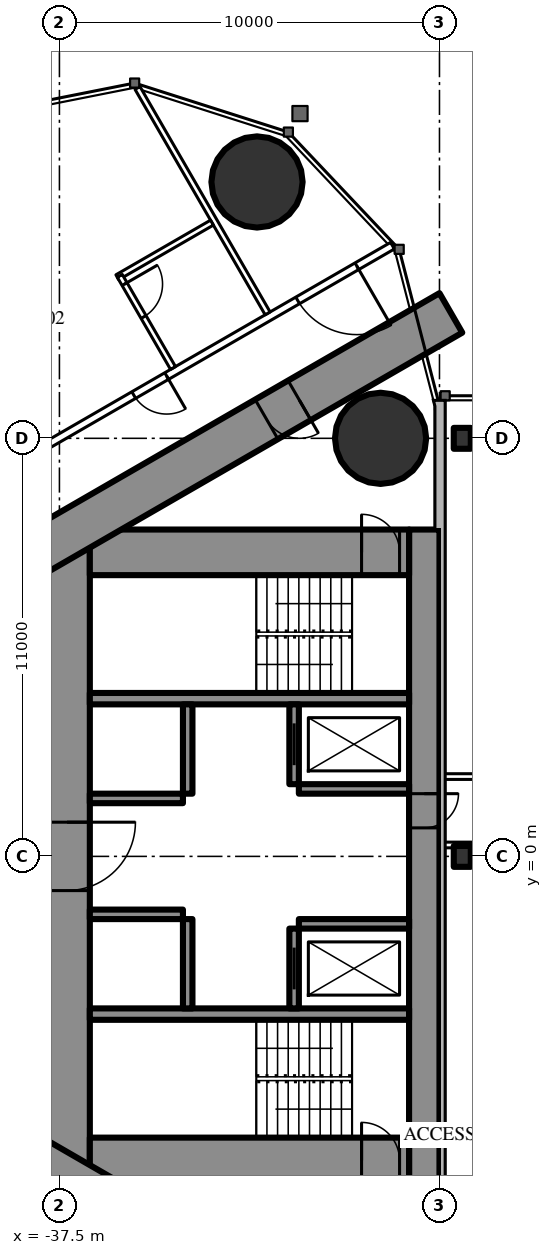
"""IFC4 building model, lengths in metres.
Left out: names, types, materials, properties, quantities, classifications, styles, units other than length and angle.
Written with IfcOpenShell. Run it as: python <this file> out.ifc"""

import sys

from ifc_helpers import new_model, si_unit, direction, frame, frame_2d, origin, origin_2d, place, context, subcontext, project, spatial, rectangle, circle, i_section, extrude, element, fill, save


model = new_model("IFC4")
c1 = context("Model", 3, precision=1e-05, world=origin(), true_north=direction((0.0, 1.0)))
c2 = subcontext(c1, "Body", "Model", "MODEL_VIEW")
j1 = project(units=[si_unit("LENGTHUNIT", "METRE"), si_unit("PLANEANGLEUNIT", "RADIAN")], contexts=[c1])
p1 = place(None, origin())
s1 = spatial("IfcSite", under=j1, at=p1, CompositionType="ELEMENT")
p2 = place(p1, origin())
s2 = spatial("IfcBuilding", under=s1, at=p2, CompositionType="ELEMENT")
p3 = place(p2, frame((0.0, 0.0, 244.1)))
s3 = spatial("IfcBuildingStorey", under=s2, at=p3, CompositionType="ELEMENT", Elevation=244.1)
for number, where, z_axis, x_axis in (
    (1, (-32.301, 17.745, 0.0), (0.0, 0.0, 1.0), (1.0, 0.0, 0.0)),
    (2, (-29.05, 11.0, 0.0), (0.0, 0.0, 1.0), (1.0, 0.0, 0.0)),
):
    element("IfcColumn", number, at=place(p3, frame(where, z_axis=z_axis, x_axis=x_axis)), inside=s3, PredefinedType="COLUMN", context=c2, shape_type="SweptSolid", body=[
        extrude(circle(Radius=1.2, at=origin_2d()), origin(), (0.0, 0.0, 1.0), 3.6),
    ])
p4 = place(p3, frame((-27.9, 8.6, 0.0), z_axis=(0.0, 0.0, 1.0), x_axis=(0.0, -1.0, 0.0)))
e3 = element("IfcWall", 3, at=p4, inside=s3, PredefinedType="SHEAR", context=c2, shape_type="SweptSolid", body=[
    extrude(rectangle(XDim=17.2, YDim=0.8, at=frame_2d((8.6, 0.0))), origin(), (0.0, 0.0, 1.0), 3.6),
])
p5 = place(p4, frame((6.95, 0.0, 0.0)))
e4 = element("IfcOpeningElement", 4, at=p5, cuts=e3, PredefinedType="OPENING", context=c2, shape_type="SweptSolid", body=[
    extrude(rectangle(XDim=0.9, YDim=2.2, at=frame_2d((0.45, 1.1))), frame((0.0, 0.41, 0.0), z_axis=(0.0, -1.0, 0.0), x_axis=(1.0, 0.0, 0.0)), (0.0, 0.0, 1.0), 0.82),
])
p6 = place(p3, frame((-37.3, 8.6, 0.0), z_axis=(0.0, 0.0, 1.0), x_axis=(0.0, -1.0, 0.0)))
e5 = element("IfcWall", 5, at=p6, inside=s3, PredefinedType="SHEAR", context=c2, shape_type="SweptSolid", body=[
    extrude(rectangle(XDim=17.2, YDim=1.2, at=frame_2d((8.6, 0.0))), origin(), (0.0, 0.0, 1.0), 3.6),
])
p7 = place(p6, frame((7.7, 0.0, 0.0)))
e6 = element("IfcOpeningElement", 6, at=p7, cuts=e5, PredefinedType="OPENING", context=c2, shape_type="SweptSolid", body=[
    extrude(rectangle(XDim=1.8, YDim=2.2, at=frame_2d((0.9, 1.1))), frame((0.0, 0.61, 0.0), z_axis=(0.0, -1.0, 0.0), x_axis=(1.0, 0.0, 0.0)), (0.0, 0.0, 1.0), 1.22),
])
p8 = place(p3, frame((-28.3, 8.0, 0.0), z_axis=(0.0, 0.0, 1.0), x_axis=(-1.0, 0.0, 0.0)))
e7 = element("IfcWall", 7, at=p8, inside=s3, PredefinedType="SHEAR", context=c2, shape_type="SweptSolid", body=[
    extrude(rectangle(XDim=8.4, YDim=1.2, at=frame_2d((4.2, 0.0))), origin(), (0.0, 0.0, 1.0), 3.6),
])
p9 = place(p8, frame((0.25, 0.0, 0.0)))
e8 = element("IfcOpeningElement", 8, at=p9, cuts=e7, PredefinedType="OPENING", context=c2, shape_type="SweptSolid", body=[
    extrude(rectangle(XDim=1.0, YDim=2.2, at=frame_2d((0.5, 1.1))), frame((0.0, 0.61, 0.0), z_axis=(0.0, -1.0, 0.0), x_axis=(1.0, 0.0, 0.0)), (0.0, 0.0, 1.0), 1.22),
])
p10 = place(p3, frame((-28.3, -8.0, 0.0), z_axis=(0.0, 0.0, 1.0), x_axis=(-1.0, 0.0, 0.0)))
e9 = element("IfcWall", 9, at=p10, inside=s3, PredefinedType="SHEAR", context=c2, shape_type="SweptSolid", body=[
    extrude(rectangle(XDim=8.4, YDim=1.2, at=frame_2d((4.2, 0.0))), origin(), (0.0, 0.0, 1.0), 3.6),
])
p11 = place(p10, frame((0.25, 0.0, 0.0)))
e10 = element("IfcOpeningElement", 10, at=p11, cuts=e9, PredefinedType="OPENING", context=c2, shape_type="SweptSolid", body=[
    extrude(rectangle(XDim=1.0, YDim=2.2, at=frame_2d((0.5, 1.1))), frame((0.0, 0.61, 0.0), z_axis=(0.0, -1.0, 0.0), x_axis=(1.0, 0.0, 0.0)), (0.0, 0.0, 1.0), 1.22),
])
for number, where, z_axis, x_axis in (
    (11, (-28.3, 4.15, 0.0), (0.0, 0.0, 1.0), (-1.0, 0.0, 0.0)),
    (12, (-28.3, -4.15, 0.0), (0.0, 0.0, 1.0), (-1.0, 0.0, 0.0)),
):
    element("IfcWall", number, at=place(p3, frame(where, z_axis=z_axis, x_axis=x_axis)), inside=s3, PredefinedType="SHEAR", context=c2, shape_type="SweptSolid", body=[
        extrude(rectangle(XDim=8.4, YDim=0.3, at=frame_2d((4.2, 0.0))), origin(), (0.0, 0.0, 1.0), 3.6),
    ])
p12 = place(p3, frame((-31.325, 4.0, 0.0), z_axis=(0.0, 0.0, 1.0), x_axis=(0.0, -1.0, 0.0)))
e13 = element("IfcWall", 13, at=p12, inside=s3, PredefinedType="SHEAR", context=c2, shape_type="SweptSolid", body=[
    extrude(rectangle(XDim=2.1, YDim=0.25, at=frame_2d((1.05, 0.0))), origin(), (0.0, 0.0, 1.0), 3.6),
])
p13 = place(p12, frame((0.5, 0.0, 0.0)))
e14 = element("IfcOpeningElement", 14, at=p13, cuts=e13, PredefinedType="OPENING", context=c2, shape_type="SweptSolid", body=[
    extrude(rectangle(XDim=1.1, YDim=2.2, at=frame_2d((0.55, 1.1))), frame((0.0, 0.135, 0.0), z_axis=(0.0, -1.0, 0.0), x_axis=(1.0, 0.0, 0.0)), (0.0, 0.0, 1.0), 0.27),
])
p14 = place(p3, frame((-34.125, 4.0, 0.0), z_axis=(0.0, 0.0, 1.0), x_axis=(0.0, -1.0, 0.0)))
e15 = element("IfcWall", 15, at=p14, inside=s3, PredefinedType="SHEAR", context=c2, shape_type="SweptSolid", body=[
    extrude(rectangle(XDim=2.35, YDim=0.25, at=frame_2d((1.175, 0.0))), origin(), (0.0, 0.0, 1.0), 3.6),
])
p15 = place(p3, frame((-28.3, 1.775, 0.0), z_axis=(0.0, 0.0, 1.0), x_axis=(-1.0, 0.0, 0.0)))
e16 = element("IfcWall", 16, at=p15, inside=s3, PredefinedType="SHEAR", context=c2, shape_type="SweptSolid", body=[
    extrude(rectangle(XDim=2.9, YDim=0.25, at=frame_2d((1.45, 0.0))), origin(), (0.0, 0.0, 1.0), 3.6),
])
p16 = place(p3, frame((-34.25, 1.525, 0.0), z_axis=(0.0, 0.0, 1.0), x_axis=(-1.0, 0.0, 0.0)))
e17 = element("IfcWall", 17, at=p16, inside=s3, PredefinedType="SHEAR", context=c2, shape_type="SweptSolid", body=[
    extrude(rectangle(XDim=2.45, YDim=0.25, at=frame_2d((1.225, 0.0))), origin(), (0.0, 0.0, 1.0), 3.6),
])
p17 = place(p3, frame((-31.325, -1.9, 0.0), z_axis=(0.0, 0.0, 1.0), x_axis=(0.0, -1.0, 0.0)))
e18 = element("IfcWall", 18, at=p17, inside=s3, PredefinedType="SHEAR", context=c2, shape_type="SweptSolid", body=[
    extrude(rectangle(XDim=2.1, YDim=0.25, at=frame_2d((1.05, 0.0))), origin(), (0.0, 0.0, 1.0), 3.6),
])
p18 = place(p17, frame((0.5, 0.0, 0.0)))
e19 = element("IfcOpeningElement", 19, at=p18, cuts=e18, PredefinedType="OPENING", context=c2, shape_type="SweptSolid", body=[
    extrude(rectangle(XDim=1.1, YDim=2.2, at=frame_2d((0.55, 1.1))), frame((0.0, 0.135, 0.0), z_axis=(0.0, -1.0, 0.0), x_axis=(1.0, 0.0, 0.0)), (0.0, 0.0, 1.0), 0.27),
])
p19 = place(p3, frame((-34.125, -1.65, 0.0), z_axis=(0.0, 0.0, 1.0), x_axis=(0.0, -1.0, 0.0)))
e20 = element("IfcWall", 20, at=p19, inside=s3, PredefinedType="SHEAR", context=c2, shape_type="SweptSolid", body=[
    extrude(rectangle(XDim=2.35, YDim=0.25, at=frame_2d((1.175, 0.0))), origin(), (0.0, 0.0, 1.0), 3.6),
])
p20 = place(p3, frame((-28.3, -1.775, 0.0), z_axis=(0.0, 0.0, 1.0), x_axis=(-1.0, 0.0, 0.0)))
e21 = element("IfcWall", 21, at=p20, inside=s3, PredefinedType="SHEAR", context=c2, shape_type="SweptSolid", body=[
    extrude(rectangle(XDim=2.9, YDim=0.25, at=frame_2d((1.45, 0.0))), origin(), (0.0, 0.0, 1.0), 3.6),
])
p21 = place(p3, frame((-34.25, -1.525, 0.0), z_axis=(0.0, 0.0, 1.0), x_axis=(-1.0, 0.0, 0.0)))
e22 = element("IfcWall", 22, at=p21, inside=s3, PredefinedType="SHEAR", context=c2, shape_type="SweptSolid", body=[
    extrude(rectangle(XDim=2.45, YDim=0.25, at=frame_2d((1.225, 0.0))), origin(), (0.0, 0.0, 1.0), 3.6),
])
p22 = place(p3, frame((-27.2, 14.3, 0.0), z_axis=(0.0, 0.0, 1.0), x_axis=(-0.866026593062, -0.499997940104, 0.0)))
e23 = element("IfcWall", 23, at=p22, inside=s3, PredefinedType="SHEAR", context=c2, shape_type="SweptSolid", body=[
    extrude(rectangle(XDim=28.946, YDim=1.2, at=frame_2d((14.473, 0.0))), origin(), (0.0, 0.0, 1.0), 3.6),
])
p23 = place(p22, frame((4.6, 0.0, 0.0)))
e24 = element("IfcOpeningElement", 24, at=p23, cuts=e23, PredefinedType="OPENING", context=c2, shape_type="SweptSolid", body=[
    extrude(rectangle(XDim=1.0, YDim=2.2, at=frame_2d((0.5, 1.1))), frame((0.0, 0.61, 0.0), z_axis=(0.0, -1.0, 0.0), x_axis=(1.0, 0.0, 0.0)), (0.0, 0.0, 1.0), 1.22),
])
p24 = place(p22, frame((13.395, 0.0, 0.0)))
e25 = element("IfcOpeningElement", 25, at=p24, cuts=e23, PredefinedType="OPENING", context=c2, shape_type="SweptSolid", body=[
    extrude(rectangle(XDim=1.8, YDim=2.2, at=frame_2d((0.9, 1.1))), frame((0.0, 0.61, 0.0), z_axis=(0.0, -1.0, 0.0), x_axis=(1.0, 0.0, 0.0)), (0.0, 0.0, 1.0), 1.22),
])
p25 = place(p3, frame((-27.2, -14.3, 0.0), z_axis=(0.0, 0.0, 1.0), x_axis=(-0.866024021859, 0.500002393557, 0.0)))
e26 = element("IfcWall", 26, at=p25, inside=s3, PredefinedType="SHEAR", context=c2, shape_type="SweptSolid", body=[
    extrude(rectangle(XDim=27.907, YDim=1.2, at=frame_2d((13.954, 0.0))), origin(), (0.0, 0.0, 1.0), 3.6),
])
p26 = place(p25, frame((4.6, 0.0, 0.0)))
e27 = element("IfcOpeningElement", 27, at=p26, cuts=e26, PredefinedType="OPENING", context=c2, shape_type="SweptSolid", body=[
    extrude(rectangle(XDim=1.0, YDim=2.2, at=frame_2d((0.5, 1.1))), frame((0.0, 0.61, 0.0), z_axis=(0.0, -1.0, 0.0), x_axis=(1.0, 0.0, 0.0)), (0.0, 0.0, 1.0), 1.22),
])
p27 = place(p25, frame((13.395, 0.0, 0.0)))
e28 = element("IfcOpeningElement", 28, at=p27, cuts=e26, PredefinedType="OPENING", context=c2, shape_type="SweptSolid", body=[
    extrude(rectangle(XDim=1.8, YDim=2.2, at=frame_2d((0.9, 1.1))), frame((0.0, 0.61, 0.0), z_axis=(0.0, -1.0, 0.0), x_axis=(1.0, 0.0, 0.0)), (0.0, 0.0, 1.0), 1.22),
])
for number, where, z_axis, x_axis in (
    (29, (-26.9, 0.0, 0.0), (0.0, 0.0, 1.0), (1.0, 0.0, 0.0)),
    (30, (-26.9, 11.0, 0.0), (0.0, 0.0, 1.0), (1.0, 0.0, 0.0)),
):
    element("IfcColumn", number, at=place(p3, frame(where, z_axis=z_axis, x_axis=x_axis)), inside=s3, PredefinedType="COLUMN", context=c2, shape_type="SweptSolid", body=[
        extrude(i_section(OverallWidth=0.448, OverallDepth=0.55, WebThickness=0.072, FlangeThickness=0.115, FilletRadius=0.02, at=origin_2d()), origin(), (0.0, 0.0, 1.0), 3.6),
    ])
p28 = place(p3, frame((-28.737, 16.068, 0.0), z_axis=(0.0, 0.0, 1.0), x_axis=(-0.866026057212, -0.499998868229, 0.0)))
e31 = element("IfcWall", 31, at=p28, inside=s3, PredefinedType="PARTITIONING", context=c2, shape_type="SweptSolid", body=[
    extrude(rectangle(XDim=32.137, YDim=0.2, at=frame_2d((16.068, 0.0))), origin(), (0.0, 0.0, 1.0), 3.35),
])
p29 = place(p28, frame((1.08, 0.0, 0.0)))
e32 = element("IfcOpeningElement", 32, at=p29, cuts=e31, PredefinedType="OPENING", context=c2, shape_type="SweptSolid", body=[
    extrude(rectangle(XDim=1.8, YDim=2.04, at=frame_2d((0.9, 1.02))), frame((0.0, 0.11, 0.0), z_axis=(0.0, -1.0, 0.0), x_axis=(1.0, 0.0, 0.0)), (0.0, 0.0, 1.0), 0.22),
])
p30 = place(p28, frame((6.86, 0.0, 0.0)))
e33 = element("IfcOpeningElement", 33, at=p30, cuts=e31, PredefinedType="OPENING", context=c2, shape_type="SweptSolid", body=[
    extrude(rectangle(XDim=1.0, YDim=2.2, at=frame_2d((0.5, 1.1))), frame((0.0, 0.11, 0.0), z_axis=(0.0, -1.0, 0.0), x_axis=(1.0, 0.0, 0.0)), (0.0, 0.0, 1.0), 0.22),
])
p31 = place(p28, frame((18.867, 0.0, 0.0)))
e34 = element("IfcOpeningElement", 34, at=p31, cuts=e31, PredefinedType="OPENING", context=c2, shape_type="SweptSolid", body=[
    extrude(rectangle(XDim=0.95, YDim=2.2, at=frame_2d((0.475, 1.1))), frame((0.0, 0.11, 0.0), z_axis=(0.0, -1.0, 0.0), x_axis=(1.0, 0.0, 0.0)), (0.0, 0.0, 1.0), 0.22),
])
p32 = place(p28, frame((23.015, 0.0, 0.0)))
e35 = element("IfcOpeningElement", 35, at=p32, cuts=e31, PredefinedType="OPENING", context=c2, shape_type="SweptSolid", body=[
    extrude(rectangle(XDim=0.95, YDim=2.2, at=frame_2d((0.475, 1.1))), frame((0.0, 0.11, 0.0), z_axis=(0.0, -1.0, 0.0), x_axis=(1.0, 0.0, 0.0)), (0.0, 0.0, 1.0), 0.22),
])
p33 = place(p28, frame((27.226, 0.0, 0.0)))
e36 = element("IfcOpeningElement", 36, at=p33, cuts=e31, PredefinedType="OPENING", context=c2, shape_type="SweptSolid", body=[
    extrude(rectangle(XDim=1.8, YDim=2.2, at=frame_2d((0.9, 1.1))), frame((0.0, 0.11, 0.0), z_axis=(0.0, -1.0, 0.0), x_axis=(1.0, 0.0, 0.0)), (0.0, 0.0, 1.0), 0.22),
])
p34 = place(p3, frame((-32.022, 14.287, 0.0), z_axis=(0.0, 0.0, 1.0), x_axis=(-0.50000019414, 0.866025291697, 0.0)))
e37 = element("IfcWall", 37, at=p34, inside=s3, PredefinedType="PARTITIONING", context=c2, shape_type="SweptSolid", body=[
    extrude(rectangle(XDim=6.848, YDim=0.15, at=frame_2d((3.424, 0.0))), origin(), (0.0, 0.0, 1.0), 3.35),
])
p35 = place(p3, frame((-33.487, 16.675, 0.0), z_axis=(0.0, 0.0, 1.0), x_axis=(-0.866039941686, -0.499974818771, 0.0)))
e38 = element("IfcWall", 38, at=p35, inside=s3, PredefinedType="PARTITIONING", context=c2, shape_type="SweptSolid", body=[
    extrude(rectangle(XDim=2.875, YDim=0.15, at=frame_2d((1.438, 0.0))), origin(), (0.0, 0.0, 1.0), 3.35),
])
p36 = place(p3, frame((-34.511, 12.85, 0.0), z_axis=(0.0, 0.0, 1.0), x_axis=(-0.500011755427, 0.866018616679, 0.0)))
e39 = element("IfcWall", 39, at=p36, inside=s3, PredefinedType="PARTITIONING", context=c2, shape_type="SweptSolid", body=[
    extrude(rectangle(XDim=2.8, YDim=0.15, at=frame_2d((1.4, 0.0))), origin(), (0.0, 0.0, 1.0), 3.35),
])
p37 = place(p36, frame((1.55, 0.0, 0.0)))
e40 = element("IfcOpeningElement", 40, at=p37, cuts=e39, PredefinedType="OPENING", context=c2, shape_type="SweptSolid", body=[
    extrude(rectangle(XDim=1.0, YDim=2.2, at=frame_2d((0.5, 1.1))), frame((0.0, 0.085, 0.0), z_axis=(0.0, -1.0, 0.0), x_axis=(1.0, 0.0, 0.0)), (0.0, 0.0, 1.0), 0.17),
])
p38 = place(p3, frame((-27.5, 0.3, 0.0), z_axis=(0.0, 0.0, 1.0), x_axis=(1.0, 0.0, 0.0)))
e41 = element("IfcWall", 41, at=p38, inside=s3, PredefinedType="PARTITIONING", context=c2, shape_type="SweptSolid", body=[
    extrude(rectangle(XDim=55.0, YDim=0.15, at=frame_2d((27.5, 0.0))), origin(), (0.0, 0.0, 1.0), 2.4),
])
p39 = place(p38, frame((1.575, 0.0, 0.0)))
e42 = element("IfcOpeningElement", 42, at=p39, cuts=e41, PredefinedType="OPENING", context=c2, shape_type="SweptSolid", body=[
    extrude(rectangle(XDim=1.0, YDim=2.2, at=frame_2d((0.5, 1.1))), frame((0.0, 0.085, 0.0), z_axis=(0.0, -1.0, 0.0), x_axis=(1.0, 0.0, 0.0)), (0.0, 0.0, 1.0), 0.17),
])
p40 = place(p38, frame((8.525, 0.0, 0.0)))
e43 = element("IfcOpeningElement", 43, at=p40, cuts=e41, PredefinedType="OPENING", context=c2, shape_type="SweptSolid", body=[
    extrude(rectangle(XDim=1.05, YDim=2.4, at=frame_2d((0.525, 1.2))), frame((0.0, 0.085, 0.0), z_axis=(0.0, -1.0, 0.0), x_axis=(1.0, 0.0, 0.0)), (0.0, 0.0, 1.0), 0.17),
])
p41 = place(p38, frame((14.025, 0.0, 0.0)))
e44 = element("IfcOpeningElement", 44, at=p41, cuts=e41, PredefinedType="OPENING", context=c2, shape_type="SweptSolid", body=[
    extrude(rectangle(XDim=1.05, YDim=2.4, at=frame_2d((0.525, 1.2))), frame((0.0, 0.085, 0.0), z_axis=(0.0, -1.0, 0.0), x_axis=(1.0, 0.0, 0.0)), (0.0, 0.0, 1.0), 0.17),
])
p42 = place(p38, frame((25.025, 0.0, 0.0)))
e45 = element("IfcOpeningElement", 45, at=p42, cuts=e41, PredefinedType="OPENING", context=c2, shape_type="SweptSolid", body=[
    extrude(rectangle(XDim=1.05, YDim=2.4, at=frame_2d((0.525, 1.2))), frame((0.0, 0.085, 0.0), z_axis=(0.0, -1.0, 0.0), x_axis=(1.0, 0.0, 0.0)), (0.0, 0.0, 1.0), 0.17),
])
p43 = place(p38, frame((30.525, 0.0, 0.0)))
e46 = element("IfcOpeningElement", 46, at=p43, cuts=e41, PredefinedType="OPENING", context=c2, shape_type="SweptSolid", body=[
    extrude(rectangle(XDim=1.05, YDim=2.4, at=frame_2d((0.525, 1.2))), frame((0.0, 0.085, 0.0), z_axis=(0.0, -1.0, 0.0), x_axis=(1.0, 0.0, 0.0)), (0.0, 0.0, 1.0), 0.17),
])
p44 = place(p38, frame((41.525, 0.0, 0.0)))
e47 = element("IfcOpeningElement", 47, at=p44, cuts=e41, PredefinedType="OPENING", context=c2, shape_type="SweptSolid", body=[
    extrude(rectangle(XDim=1.05, YDim=2.4, at=frame_2d((0.525, 1.2))), frame((0.0, 0.085, 0.0), z_axis=(0.0, -1.0, 0.0), x_axis=(1.0, 0.0, 0.0)), (0.0, 0.0, 1.0), 0.17),
])
p45 = place(p38, frame((47.025, 0.0, 0.0)))
e48 = element("IfcOpeningElement", 48, at=p45, cuts=e41, PredefinedType="OPENING", context=c2, shape_type="SweptSolid", body=[
    extrude(rectangle(XDim=1.05, YDim=2.4, at=frame_2d((0.525, 1.2))), frame((0.0, 0.085, 0.0), z_axis=(0.0, -1.0, 0.0), x_axis=(1.0, 0.0, 0.0)), (0.0, 0.0, 1.0), 0.17),
])
p46 = place(p38, frame((52.525, 0.0, 0.0)))
e49 = element("IfcOpeningElement", 49, at=p46, cuts=e41, PredefinedType="OPENING", context=c2, shape_type="SweptSolid", body=[
    extrude(rectangle(XDim=1.05, YDim=2.4, at=frame_2d((0.525, 1.2))), frame((0.0, 0.085, 0.0), z_axis=(0.0, -1.0, 0.0), x_axis=(1.0, 0.0, 0.0)), (0.0, 0.0, 1.0), 0.17),
])
p47 = place(p3, frame((-27.5, 2.1, 0.0), z_axis=(0.0, 0.0, 1.0), x_axis=(1.0, 0.0, 0.0)))
e50 = element("IfcWall", 50, at=p47, inside=s3, PredefinedType="PARTITIONING", context=c2, shape_type="SweptSolid", body=[
    extrude(rectangle(XDim=5.85, YDim=0.15, at=frame_2d((2.925, 0.0))), origin(), (0.0, 0.0, 1.0), 3.4),
])
p48 = place(p47, frame((2.025, 0.0, 0.0)))
e51 = element("IfcOpeningElement", 51, at=p48, cuts=e50, PredefinedType="OPENING", context=c2, shape_type="SweptSolid", body=[
    extrude(rectangle(XDim=1.05, YDim=2.4, at=frame_2d((0.525, 1.2))), frame((0.0, 0.085, 0.0), z_axis=(0.0, -1.0, 0.0), x_axis=(1.0, 0.0, 0.0)), (0.0, 0.0, 1.0), 0.17),
])
p49 = place(p29, origin())
e52 = element("IfcDoor", 52, at=p49, inside=s3, OperationType="DOUBLE_DOOR_SINGLE_SWING", PredefinedType="DOOR", context=c2, shape_type="SweptSolid", body=[
    extrude(rectangle(XDim=1.8, YDim=2.04, at=frame_2d((0.9, 1.02))), frame((0.0, 0.025, 0.0), z_axis=(0.0, -1.0, 0.0), x_axis=(1.0, 0.0, 0.0)), (0.0, 0.0, 1.0), 0.05),
])
fill(e32, e52)
p50 = place(p37, origin())
e53 = element("IfcDoor", 53, at=p50, inside=s3, OperationType="SINGLE_SWING_RIGHT", PredefinedType="DOOR", context=c2, shape_type="SweptSolid", body=[
    extrude(rectangle(XDim=1.0, YDim=2.2, at=frame_2d((0.5, 1.1))), frame((0.0, 0.025, 0.0), z_axis=(0.0, -1.0, 0.0), x_axis=(1.0, 0.0, 0.0)), (0.0, 0.0, 1.0), 0.05),
])
fill(e40, e53)
p51 = place(p30, origin())
e54 = element("IfcDoor", 54, at=p51, inside=s3, OperationType="SINGLE_SWING_LEFT", PredefinedType="DOOR", context=c2, shape_type="SweptSolid", body=[
    extrude(rectangle(XDim=1.0, YDim=2.2, at=frame_2d((0.5, 1.1))), frame((0.0, 0.025, 0.0), z_axis=(0.0, -1.0, 0.0), x_axis=(1.0, 0.0, 0.0)), (0.0, 0.0, 1.0), 0.05),
])
fill(e33, e54)
p52 = place(p23, origin())
e55 = element("IfcDoor", 55, at=p52, inside=s3, OperationType="SINGLE_SWING_LEFT", PredefinedType="DOOR", context=c2, shape_type="SweptSolid", body=[
    extrude(rectangle(XDim=1.0, YDim=2.2, at=frame_2d((0.5, 1.1))), frame((0.0, 0.025, 0.0), z_axis=(0.0, -1.0, 0.0), x_axis=(1.0, 0.0, 0.0)), (0.0, 0.0, 1.0), 0.05),
])
fill(e24, e55)
p53 = place(p7, origin())
e56 = element("IfcDoor", 56, at=p53, inside=s3, OperationType="DOUBLE_DOOR_SINGLE_SWING", PredefinedType="DOOR", context=c2, shape_type="SweptSolid", body=[
    extrude(rectangle(XDim=1.8, YDim=2.2, at=frame_2d((0.9, 1.1))), frame((0.0, 0.025, 0.0), z_axis=(0.0, -1.0, 0.0), x_axis=(1.0, 0.0, 0.0)), (0.0, 0.0, 1.0), 0.05),
])
fill(e6, e56)
p54 = place(p9, origin())
e57 = element("IfcDoor", 57, at=p54, inside=s3, OperationType="SINGLE_SWING_RIGHT", PredefinedType="DOOR", context=c2, shape_type="SweptSolid", body=[
    extrude(rectangle(XDim=1.0, YDim=2.2, at=frame_2d((0.5, 1.1))), frame((0.0, 0.025, 0.0), z_axis=(0.0, -1.0, 0.0), x_axis=(1.0, 0.0, 0.0)), (0.0, 0.0, 1.0), 0.05),
])
fill(e8, e57)
p55 = place(p11, origin())
e58 = element("IfcDoor", 58, at=p55, inside=s3, OperationType="SINGLE_SWING_RIGHT", PredefinedType="DOOR", context=c2, shape_type="SweptSolid", body=[
    extrude(rectangle(XDim=1.0, YDim=2.2, at=frame_2d((0.5, 1.1))), frame((0.0, 0.025, 0.0), z_axis=(0.0, -1.0, 0.0), x_axis=(1.0, 0.0, 0.0)), (0.0, 0.0, 1.0), 0.05),
])
fill(e10, e58)
p56 = place(p5, origin())
e59 = element("IfcDoor", 59, at=p56, inside=s3, OperationType="SINGLE_SWING_LEFT", PredefinedType="DOOR", context=c2, shape_type="SweptSolid", body=[
    extrude(rectangle(XDim=0.9, YDim=2.2, at=frame_2d((0.45, 1.1))), frame((0.0, 0.025, 0.0), z_axis=(0.0, -1.0, 0.0), x_axis=(1.0, 0.0, 0.0)), (0.0, 0.0, 1.0), 0.05),
])
fill(e4, e59)
p57 = place(p13, origin())
e60 = element("IfcDoor", 60, at=p57, inside=s3, OperationType="SLIDING_TO_LEFT", PredefinedType="USERDEFINED", context=c2, shape_type="SweptSolid", body=[
    extrude(rectangle(XDim=1.1, YDim=2.2, at=frame_2d((0.55, 1.1))), frame((0.0, 0.025, 0.0), z_axis=(0.0, -1.0, 0.0), x_axis=(1.0, 0.0, 0.0)), (0.0, 0.0, 1.0), 0.05),
])
fill(e14, e60)
p58 = place(p18, origin())
e61 = element("IfcDoor", 61, at=p58, inside=s3, OperationType="SLIDING_TO_LEFT", PredefinedType="USERDEFINED", context=c2, shape_type="SweptSolid", body=[
    extrude(rectangle(XDim=1.1, YDim=2.2, at=frame_2d((0.55, 1.1))), frame((0.0, 0.025, 0.0), z_axis=(0.0, -1.0, 0.0), x_axis=(1.0, 0.0, 0.0)), (0.0, 0.0, 1.0), 0.05),
])
fill(e19, e61)
save(model, sys.argv[1])
